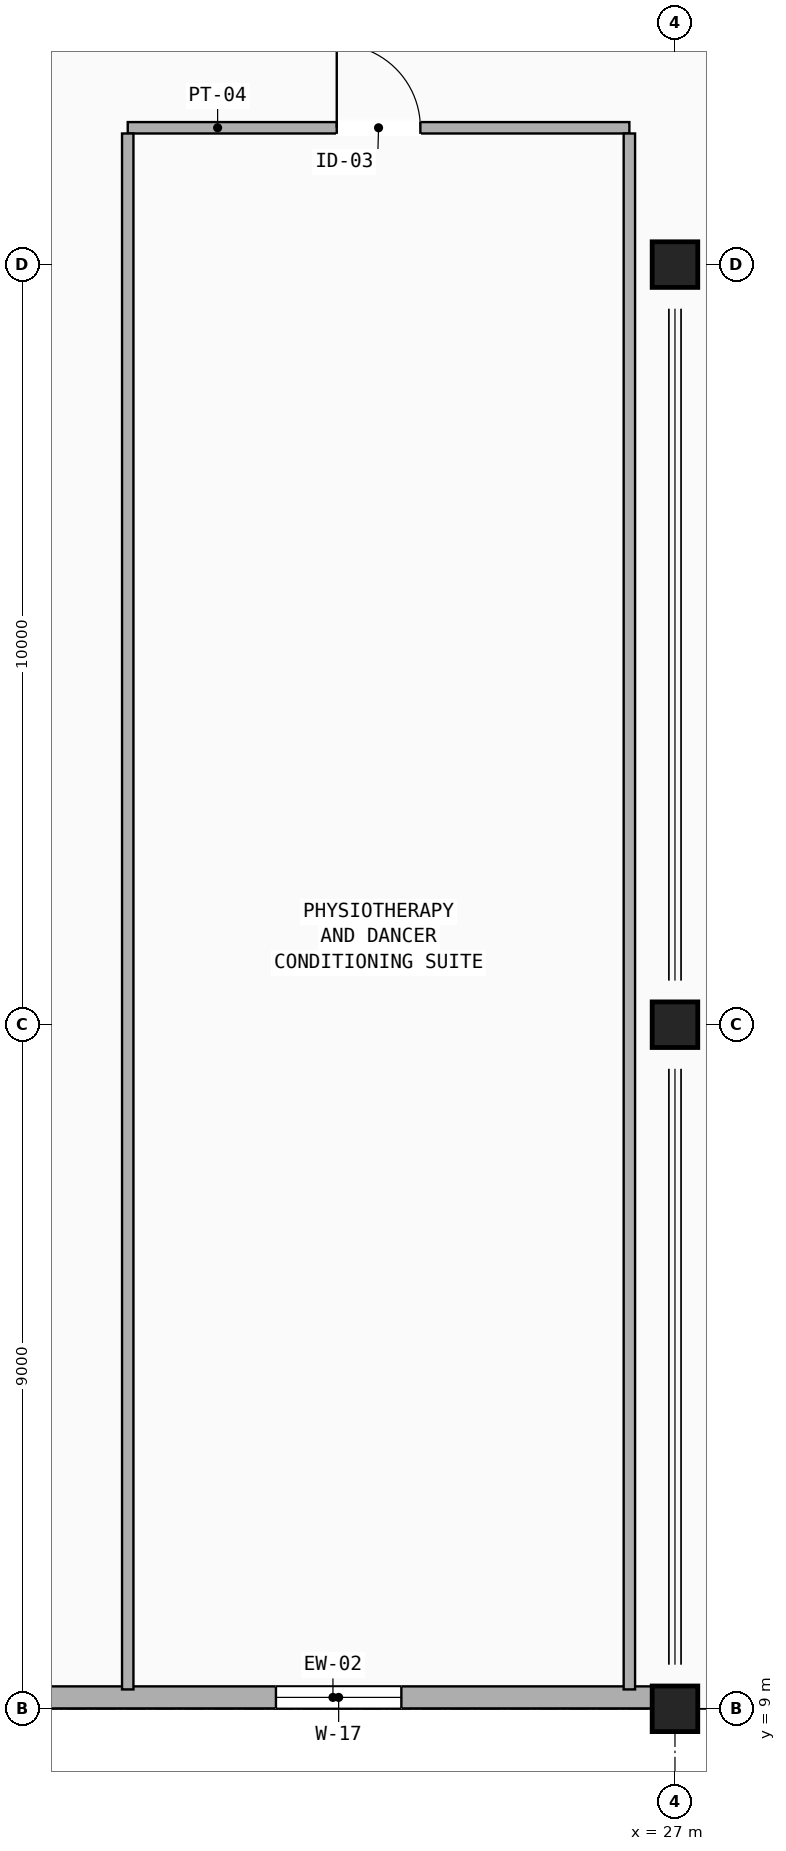
"""IFC4 building model, lengths in metres.
Left out: names, types, materials, properties, quantities, classifications, styles, units other than length and angle.
Written with IfcOpenShell. Run it as: python <this file> out.ifc"""

import sys

from ifc_helpers import new_model, si_unit, direction, frame, frame_2d, origin, origin_2d, place, context, subcontext, project, spatial, rectangle, extrude, element, fill, save


model = new_model("IFC4")
c1 = context("Model", 3, precision=1e-05, world=origin(), true_north=direction((0.0, 1.0)))
c2 = subcontext(c1, "Body", "Model", "MODEL_VIEW")
j1 = project(units=[si_unit("LENGTHUNIT", "METRE"), si_unit("PLANEANGLEUNIT", "RADIAN")], contexts=[c1])
p1 = place(None, origin())
s1 = spatial("IfcSite", under=j1, at=p1, CompositionType="ELEMENT")
p2 = place(p1, origin())
s2 = spatial("IfcBuilding", under=s1, at=p2, CompositionType="ELEMENT")
p3 = place(p2, frame((0.0, 0.0, 13.6)))
s3 = spatial("IfcBuildingStorey", under=s2, at=p3, CompositionType="ELEMENT", Elevation=13.6)
for number, where, z_axis, x_axis in (
    (1, (27.0, 9.0, 0.0), (0.0, 0.0, 1.0), (1.0, 0.0, 0.0)),
    (2, (27.0, 18.0, 0.0), (0.0, 0.0, 1.0), (1.0, 0.0, 0.0)),
    (3, (27.0, 28.0, 0.0), (0.0, 0.0, 1.0), (1.0, 0.0, 0.0)),
):
    element("IfcColumn", number, at=place(p3, frame(where, z_axis=z_axis, x_axis=x_axis)), inside=s3, PredefinedType="COLUMN", context=c2, shape_type="SweptSolid", body=[
        extrude(rectangle(XDim=0.6, YDim=0.6, at=origin_2d()), origin(), (0.0, 0.0, 1.0), 4.08),
    ])
p4 = place(p3, frame((18.3, 9.15, 0.0), z_axis=(0.0, 0.0, 1.0), x_axis=(1.0, 0.0, 0.0)))
e4 = element("IfcWall", 4, at=p4, inside=s3, PredefinedType="STANDARD", context=c2, shape_type="SweptSolid", body=[
    extrude(rectangle(XDim=8.4, YDim=0.29, at=frame_2d((4.2, 0.0))), origin(), (0.0, 0.0, 1.0), 3.277),
])
p5 = place(p4, frame((3.45, 0.0, 0.9)))
e5 = element("IfcOpeningElement", 5, at=p5, cuts=e4, PredefinedType="OPENING", context=c2, shape_type="SweptSolid", body=[
    extrude(rectangle(XDim=1.65, YDim=1.95, at=frame_2d((0.825, 0.975))), frame((0.0, 0.155, 0.0), z_axis=(0.0, -1.0, 0.0), x_axis=(1.0, 0.0, 0.0)), (0.0, 0.0, 1.0), 0.31),
])
p6 = place(p3, frame((19.8, 29.8, 0.0), z_axis=(0.0, 0.0, 1.0), x_axis=(1.0, 0.0, 0.0)))
e6 = element("IfcWall", 6, at=p6, inside=s3, PredefinedType="PARTITIONING", context=c2, shape_type="SweptSolid", body=[
    extrude(rectangle(XDim=6.6, YDim=0.15, at=frame_2d((3.3, 0.0))), origin(), (0.0, 0.0, 1.0), 3.84),
])
p7 = place(p6, frame((2.75, 0.0, 0.0)))
e7 = element("IfcOpeningElement", 7, at=p7, cuts=e6, PredefinedType="OPENING", context=c2, shape_type="SweptSolid", body=[
    extrude(rectangle(XDim=1.1, YDim=2.2, at=frame_2d((0.55, 1.1))), frame((0.0, 0.085, 0.0), z_axis=(0.0, -1.0, 0.0), x_axis=(1.0, 0.0, 0.0)), (0.0, 0.0, 1.0), 0.17),
])
for number, where, z_axis, x_axis in (
    (8, (19.8, 9.255, 0.0), (0.0, 0.0, 1.0), (0.0, 1.0, 0.0)),
    (9, (26.4, 9.255, 0.0), (0.0, 0.0, 1.0), (0.0, 1.0, 0.0)),
):
    element("IfcWall", number, at=place(p3, frame(where, z_axis=z_axis, x_axis=x_axis)), inside=s3, PredefinedType="PARTITIONING", context=c2, shape_type="SweptSolid", body=[
        extrude(rectangle(XDim=20.47, YDim=0.15, at=frame_2d((10.235, 0.0))), origin(), (0.0, 0.0, 1.0), 3.277),
    ])
p8 = place(p5, origin())
e10 = element("IfcWindow", 10, at=p8, inside=s3, PartitioningType="DOUBLE_PANEL_VERTICAL", PredefinedType="WINDOW", context=c2, shape_type="SweptSolid", body=[
    extrude(rectangle(XDim=1.65, YDim=1.95, at=frame_2d((0.825, 0.975))), frame((0.0, 0.03, 0.0), z_axis=(0.0, -1.0, 0.0), x_axis=(1.0, 0.0, 0.0)), (0.0, 0.0, 1.0), 0.06),
])
fill(e5, e10)
p9 = place(p7, origin())
e11 = element("IfcDoor", 11, at=p9, inside=s3, OperationType="SINGLE_SWING_LEFT", PredefinedType="DOOR", context=c2, shape_type="SweptSolid", body=[
    extrude(rectangle(XDim=1.1, YDim=2.2, at=frame_2d((0.55, 1.1))), frame((0.0, 0.025, 0.0), z_axis=(0.0, -1.0, 0.0), x_axis=(1.0, 0.0, 0.0)), (0.0, 0.0, 1.0), 0.05),
])
fill(e7, e11)
save(model, sys.argv[1])
